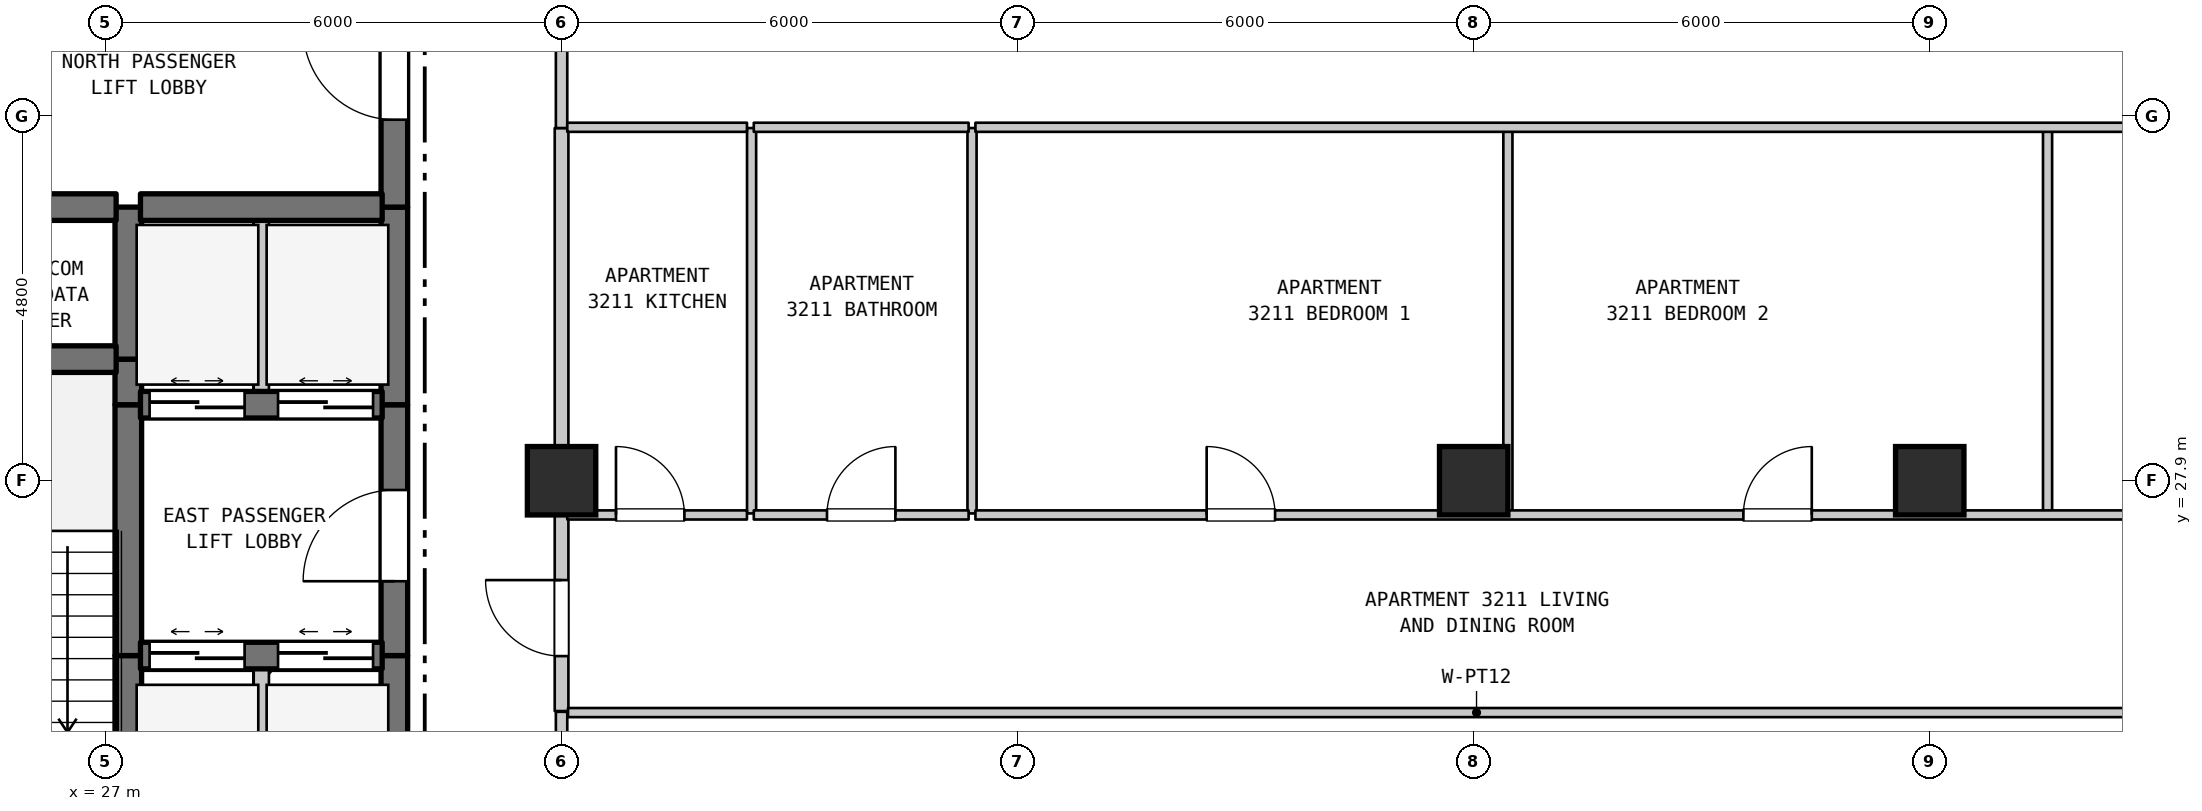
"""IFC4 building model, lengths in metres.
Left out: names, types, materials, properties, quantities, classifications, styles, units other than length and angle.
Written with IfcOpenShell. Run it as: python <this file> out.ifc"""

import sys

from ifc_helpers import new_model, si_unit, direction, frame, frame_2d, origin, origin_2d, place, context, subcontext, project, spatial, rectangle, extrude, element, fill, save


model = new_model("IFC4")
c1 = context("Model", 3, precision=1e-05, world=origin(), true_north=direction((0.0, 1.0)))
c2 = subcontext(c1, "Body", "Model", "MODEL_VIEW")
j1 = project(units=[si_unit("LENGTHUNIT", "METRE"), si_unit("PLANEANGLEUNIT", "RADIAN")], contexts=[c1])
p1 = place(None, origin())
s1 = spatial("IfcSite", under=j1, at=p1, CompositionType="ELEMENT")
p2 = place(p1, origin())
s2 = spatial("IfcBuilding", under=s1, at=p2, CompositionType="ELEMENT")
p3 = place(p2, frame((0.0, 0.0, 133.5)))
s3 = spatial("IfcBuildingStorey", under=s2, at=p3, CompositionType="ELEMENT", Elevation=133.5)
for number, where, z_axis, x_axis in (
    (1, (33.0, 27.9, 0.0), (0.0, 0.0, 1.0), (1.0, 0.0, 0.0)),
    (2, (45.0, 27.9, 0.0), (0.0, 0.0, 1.0), (1.0, 0.0, 0.0)),
    (3, (51.0, 27.9, 0.0), (0.0, 0.0, 1.0), (1.0, 0.0, 0.0)),
):
    element("IfcColumn", number, at=place(p3, frame(where, z_axis=z_axis, x_axis=x_axis)), inside=s3, PredefinedType="COLUMN", context=c2, shape_type="SweptSolid", body=[
        extrude(rectangle(XDim=0.9, YDim=0.9, at=origin_2d()), origin(), (0.0, 0.0, 1.0), 3.7),
    ])
p4 = place(p3, frame((27.3, 22.7, 0.0), z_axis=(0.0, 0.0, 1.0), x_axis=(0.0, 1.0, 0.0)))
e4 = element("IfcWall", 4, at=p4, inside=s3, PredefinedType="SHEAR", context=c2, shape_type="SweptSolid", body=[
    extrude(rectangle(XDim=2.9, YDim=0.35, at=frame_2d((1.45, 0.0))), origin(), (0.0, 0.0, 1.0), 3.385),
])
p5 = place(p3, frame((27.3, 25.6, 0.0), z_axis=(0.0, 0.0, 1.0), x_axis=(0.0, 1.0, 0.0)))
e5 = element("IfcWall", 5, at=p5, inside=s3, PredefinedType="SHEAR", context=c2, shape_type="SweptSolid", body=[
    extrude(rectangle(XDim=3.3, YDim=0.35, at=frame_2d((1.65, 0.0))), origin(), (0.0, 0.0, 1.0), 3.385),
])
p6 = place(p3, frame((27.3, 28.9, 0.0), z_axis=(0.0, 0.0, 1.0), x_axis=(0.0, 1.0, 0.0)))
e6 = element("IfcWall", 6, at=p6, inside=s3, PredefinedType="SHEAR", context=c2, shape_type="SweptSolid", body=[
    extrude(rectangle(XDim=0.6, YDim=0.35, at=frame_2d((0.3, 0.0))), origin(), (0.0, 0.0, 1.0), 3.385),
])
p7 = place(p3, frame((27.3, 29.5, 0.0), z_axis=(0.0, 0.0, 1.0), x_axis=(0.0, 1.0, 0.0)))
e7 = element("IfcWall", 7, at=p7, inside=s3, PredefinedType="SHEAR", context=c2, shape_type="SweptSolid", body=[
    extrude(rectangle(XDim=2.0, YDim=0.35, at=frame_2d((1.0, 0.0))), origin(), (0.0, 0.0, 1.0), 3.385),
])
p8 = place(p3, frame((29.05, 22.7, 0.0), z_axis=(0.0, 0.0, 1.0), x_axis=(0.0, 1.0, 0.0)))
e8 = element("IfcWall", 8, at=p8, inside=s3, PredefinedType="STANDARD", context=c2, shape_type="SweptSolid", body=[
    extrude(rectangle(XDim=2.9, YDim=0.2, at=frame_2d((1.45, 0.0))), origin(), (0.0, 0.0, 1.0), 3.385),
])
p9 = place(p3, frame((29.05, 28.9, 0.0), z_axis=(0.0, 0.0, 1.0), x_axis=(0.0, 1.0, 0.0)))
e9 = element("IfcWall", 9, at=p9, inside=s3, PredefinedType="STANDARD", context=c2, shape_type="SweptSolid", body=[
    extrude(rectangle(XDim=2.6, YDim=0.2, at=frame_2d((1.3, 0.0))), origin(), (0.0, 0.0, 1.0), 3.385),
])
p10 = place(p3, frame((30.8, 22.7, 0.0), z_axis=(0.0, 0.0, 1.0), x_axis=(0.0, 1.0, 0.0)))
e10 = element("IfcWall", 10, at=p10, inside=s3, PredefinedType="SHEAR", context=c2, shape_type="SweptSolid", body=[
    extrude(rectangle(XDim=2.9, YDim=0.35, at=frame_2d((1.45, 0.0))), origin(), (0.0, 0.0, 1.0), 3.385),
])
p11 = place(p3, frame((30.8, 25.6, 0.0), z_axis=(0.0, 0.0, 1.0), x_axis=(0.0, 1.0, 0.0)))
e11 = element("IfcWall", 11, at=p11, inside=s3, PredefinedType="SHEAR", context=c2, shape_type="SweptSolid", body=[
    extrude(rectangle(XDim=3.3, YDim=0.35, at=frame_2d((1.65, 0.0))), origin(), (0.0, 0.0, 1.0), 3.385),
])
p12 = place(p11, frame((0.978, 0.0, 0.0)))
e12 = element("IfcOpeningElement", 12, at=p12, cuts=e11, PredefinedType="OPENING", context=c2, shape_type="SweptSolid", body=[
    extrude(rectangle(XDim=1.2, YDim=2.2, at=frame_2d((0.6, 1.1))), frame((0.0, 0.185, 0.0), z_axis=(0.0, -1.0, 0.0), x_axis=(1.0, 0.0, 0.0)), (0.0, 0.0, 1.0), 0.37),
])
p13 = place(p3, frame((30.8, 28.9, 0.0), z_axis=(0.0, 0.0, 1.0), x_axis=(0.0, 1.0, 0.0)))
e13 = element("IfcWall", 13, at=p13, inside=s3, PredefinedType="SHEAR", context=c2, shape_type="SweptSolid", body=[
    extrude(rectangle(XDim=2.6, YDim=0.35, at=frame_2d((1.3, 0.0))), origin(), (0.0, 0.0, 1.0), 3.385),
])
p14 = place(p3, frame((30.8, 31.5, 0.0), z_axis=(0.0, 0.0, 1.0), x_axis=(0.0, 1.0, 0.0)))
e14 = element("IfcWall", 14, at=p14, inside=s3, PredefinedType="SHEAR", context=c2, shape_type="SweptSolid", body=[
    extrude(rectangle(XDim=3.5, YDim=0.35, at=frame_2d((1.75, 0.0))), origin(), (0.0, 0.0, 1.0), 3.385),
])
p15 = place(p14, frame((1.15, 0.0, 0.0)))
e15 = element("IfcOpeningElement", 15, at=p15, cuts=e14, PredefinedType="OPENING", context=c2, shape_type="SweptSolid", body=[
    extrude(rectangle(XDim=1.2, YDim=2.2, at=frame_2d((0.6, 1.1))), frame((0.0, 0.185, 0.0), z_axis=(0.0, -1.0, 0.0), x_axis=(1.0, 0.0, 0.0)), (0.0, 0.0, 1.0), 0.37),
])
p16 = place(p3, frame((33.0, 19.51, 0.0), z_axis=(0.0, 0.0, 1.0), x_axis=(0.0, 1.0, 0.0)))
e16 = element("IfcWall", 16, at=p16, inside=s3, PredefinedType="STANDARD", context=c2, shape_type="SweptSolid", body=[
    extrude(rectangle(XDim=5.35, YDim=0.15, at=frame_2d((2.675, 0.0))), origin(), (0.0, 0.0, 1.0), 2.935),
])
p17 = place(p16, frame((1.534, 0.0, 0.0)))
e17 = element("IfcOpeningElement", 17, at=p17, cuts=e16, PredefinedType="OPENING", context=c2, shape_type="SweptSolid", body=[
    extrude(rectangle(XDim=1.0, YDim=2.15, at=frame_2d((0.5, 1.075))), frame((0.0, 0.085, 0.0), z_axis=(0.0, -1.0, 0.0), x_axis=(1.0, 0.0, 0.0)), (0.0, 0.0, 1.0), 0.17),
])
p18 = place(p3, frame((33.0, 24.87, 0.0), z_axis=(0.0, 0.0, 1.0), x_axis=(0.0, 1.0, 0.0)))
e18 = element("IfcWall", 18, at=p18, inside=s3, PredefinedType="STANDARD", context=c2, shape_type="SweptSolid", body=[
    extrude(rectangle(XDim=2.6, YDim=0.18, at=frame_2d((1.3, 0.0))), origin(), (0.0, 0.0, 1.0), 2.935),
])
p19 = place(p18, frame((0.723, 0.0, 0.0)))
e19 = element("IfcOpeningElement", 19, at=p19, cuts=e18, PredefinedType="OPENING", context=c2, shape_type="SweptSolid", body=[
    extrude(rectangle(XDim=1.0, YDim=2.15, at=frame_2d((0.5, 1.075))), frame((0.0, 0.1, 0.0), z_axis=(0.0, -1.0, 0.0), x_axis=(1.0, 0.0, 0.0)), (0.0, 0.0, 1.0), 0.2),
])
p20 = place(p3, frame((33.0, 27.47, 0.0), z_axis=(0.0, 0.0, 1.0), x_axis=(0.0, 1.0, 0.0)))
e20 = element("IfcWall", 20, at=p20, inside=s3, PredefinedType="STANDARD", context=c2, shape_type="SweptSolid", body=[
    extrude(rectangle(XDim=5.07, YDim=0.18, at=frame_2d((2.535, 0.0))), origin(), (0.0, 0.0, 1.0), 2.885),
])
p21 = place(p3, frame((33.0, 32.54, 0.0), z_axis=(0.0, 0.0, 1.0), x_axis=(0.0, 1.0, 0.0)))
e21 = element("IfcWall", 21, at=p21, inside=s3, PredefinedType="STANDARD", context=c2, shape_type="SweptSolid", body=[
    extrude(rectangle(XDim=5.36, YDim=0.15, at=frame_2d((2.68, 0.0))), origin(), (0.0, 0.0, 1.0), 2.885),
])
p22 = place(p21, frame((2.109, 0.0, 0.0)))
e22 = element("IfcOpeningElement", 22, at=p22, cuts=e21, PredefinedType="OPENING", context=c2, shape_type="SweptSolid", body=[
    extrude(rectangle(XDim=1.0, YDim=2.15, at=frame_2d((0.5, 1.075))), frame((0.0, 0.085, 0.0), z_axis=(0.0, -1.0, 0.0), x_axis=(1.0, 0.0, 0.0)), (0.0, 0.0, 1.0), 0.17),
])
for number, where, z_axis, x_axis in (
    (23, (35.5, 27.47, 0.0), (0.0, 0.0, 1.0), (0.0, 1.0, 0.0)),
    (24, (38.4, 27.47, 0.0), (0.0, 0.0, 1.0), (0.0, 1.0, 0.0)),
    (25, (45.45, 27.47, 0.0), (0.0, 0.0, 1.0), (0.0, 1.0, 0.0)),
    (26, (52.55, 27.47, 0.0), (0.0, 0.0, 1.0), (0.0, 1.0, 0.0)),
):
    element("IfcWall", number, at=place(p3, frame(where, z_axis=z_axis, x_axis=x_axis)), inside=s3, PredefinedType="PARTITIONING", context=c2, shape_type="SweptSolid", body=[
        extrude(rectangle(XDim=5.07, YDim=0.12, at=frame_2d((2.535, 0.0))), origin(), (0.0, 0.0, 1.0), 3.385),
    ])
p23 = place(p3, frame((33.085, 24.85, 0.0), z_axis=(0.0, 0.0, 1.0), x_axis=(1.0, 0.0, 0.0)))
e27 = element("IfcWall", 27, at=p23, inside=s3, PredefinedType="PARTITIONING", context=c2, shape_type="SweptSolid", body=[
    extrude(rectangle(XDim=23.905, YDim=0.12, at=frame_2d((11.953, 0.0))), origin(), (0.0, 0.0, 1.0), 3.385),
])
p24 = place(p3, frame((27.46, 25.6, 0.0), z_axis=(0.0, 0.0, 1.0), x_axis=(1.0, 0.0, 0.0)))
e28 = element("IfcWall", 28, at=p24, inside=s3, PredefinedType="SHEAR", context=c2, shape_type="SweptSolid", body=[
    extrude(rectangle(XDim=3.18, YDim=0.35, at=frame_2d((1.59, 0.0))), origin(), (0.0, 0.0, 1.0), 3.385),
])
p25 = place(p24, frame((0.12, 0.0, 0.0)))
e29 = element("IfcOpeningElement", 29, at=p25, cuts=e28, PredefinedType="OPENING", context=c2, shape_type="SweptSolid", body=[
    extrude(rectangle(XDim=1.25, YDim=2.2, at=frame_2d((0.625, 1.1))), frame((0.0, 0.185, 0.0), z_axis=(0.0, -1.0, 0.0), x_axis=(1.0, 0.0, 0.0)), (0.0, 0.0, 1.0), 0.37),
])
p26 = place(p24, frame((1.81, 0.0, 0.0)))
e30 = element("IfcOpeningElement", 30, at=p26, cuts=e28, PredefinedType="OPENING", context=c2, shape_type="SweptSolid", body=[
    extrude(rectangle(XDim=1.25, YDim=2.2, at=frame_2d((0.625, 1.1))), frame((0.0, 0.185, 0.0), z_axis=(0.0, -1.0, 0.0), x_axis=(1.0, 0.0, 0.0)), (0.0, 0.0, 1.0), 0.37),
])
p27 = place(p3, frame((33.075, 27.45, 0.0), z_axis=(0.0, 0.0, 1.0), x_axis=(1.0, 0.0, 0.0)))
e31 = element("IfcWall", 31, at=p27, inside=s3, PredefinedType="PARTITIONING", context=c2, shape_type="SweptSolid", body=[
    extrude(rectangle(XDim=2.364, YDim=0.12, at=frame_2d((1.182, 0.0))), origin(), (0.0, 0.0, 1.0), 3.385),
])
p28 = place(p27, frame((0.641, 0.0, 0.0)))
e32 = element("IfcOpeningElement", 32, at=p28, cuts=e31, PredefinedType="OPENING", context=c2, shape_type="SweptSolid", body=[
    extrude(rectangle(XDim=0.9, YDim=2.15, at=frame_2d((0.45, 1.075))), frame((0.0, 0.07, 0.0), z_axis=(0.0, -1.0, 0.0), x_axis=(1.0, 0.0, 0.0)), (0.0, 0.0, 1.0), 0.14),
])
p29 = place(p3, frame((35.529, 27.45, 0.0), z_axis=(0.0, 0.0, 1.0), x_axis=(1.0, 0.0, 0.0)))
e33 = element("IfcWall", 33, at=p29, inside=s3, PredefinedType="PARTITIONING", context=c2, shape_type="SweptSolid", body=[
    extrude(rectangle(XDim=2.826, YDim=0.12, at=frame_2d((1.413, 0.0))), origin(), (0.0, 0.0, 1.0), 3.385),
])
p30 = place(p29, frame((0.963, 0.0, 0.0)))
e34 = element("IfcOpeningElement", 34, at=p30, cuts=e33, PredefinedType="OPENING", context=c2, shape_type="SweptSolid", body=[
    extrude(rectangle(XDim=0.9, YDim=2.1, at=frame_2d((0.45, 1.05))), frame((0.0, 0.07, 0.0), z_axis=(0.0, -1.0, 0.0), x_axis=(1.0, 0.0, 0.0)), (0.0, 0.0, 1.0), 0.14),
])
p31 = place(p3, frame((38.445, 27.45, 0.0), z_axis=(0.0, 0.0, 1.0), x_axis=(1.0, 0.0, 0.0)))
e35 = element("IfcWall", 35, at=p31, inside=s3, PredefinedType="PARTITIONING", context=c2, shape_type="SweptSolid", body=[
    extrude(rectangle(XDim=18.545, YDim=0.12, at=frame_2d((9.272, 0.0))), origin(), (0.0, 0.0, 1.0), 3.385),
])
p32 = place(p31, frame((3.042, 0.0, 0.0)))
e36 = element("IfcOpeningElement", 36, at=p32, cuts=e35, PredefinedType="OPENING", context=c2, shape_type="SweptSolid", body=[
    extrude(rectangle(XDim=0.9, YDim=2.15, at=frame_2d((0.45, 1.075))), frame((0.0, 0.07, 0.0), z_axis=(0.0, -1.0, 0.0), x_axis=(1.0, 0.0, 0.0)), (0.0, 0.0, 1.0), 0.14),
])
p33 = place(p31, frame((10.103, 0.0, 0.0)))
e37 = element("IfcOpeningElement", 37, at=p33, cuts=e35, PredefinedType="OPENING", context=c2, shape_type="SweptSolid", body=[
    extrude(rectangle(XDim=0.9, YDim=2.15, at=frame_2d((0.45, 1.075))), frame((0.0, 0.07, 0.0), z_axis=(0.0, -1.0, 0.0), x_axis=(1.0, 0.0, 0.0)), (0.0, 0.0, 1.0), 0.14),
])
p34 = place(p31, frame((15.791, 0.0, 0.0)))
e38 = element("IfcOpeningElement", 38, at=p34, cuts=e35, PredefinedType="OPENING", context=c2, shape_type="SweptSolid", body=[
    extrude(rectangle(XDim=0.9, YDim=2.15, at=frame_2d((0.45, 1.075))), frame((0.0, 0.07, 0.0), z_axis=(0.0, -1.0, 0.0), x_axis=(1.0, 0.0, 0.0)), (0.0, 0.0, 1.0), 0.14),
])
p35 = place(p3, frame((27.46, 28.9, 0.0), z_axis=(0.0, 0.0, 1.0), x_axis=(1.0, 0.0, 0.0)))
e39 = element("IfcWall", 39, at=p35, inside=s3, PredefinedType="SHEAR", context=c2, shape_type="SweptSolid", body=[
    extrude(rectangle(XDim=3.18, YDim=0.35, at=frame_2d((1.59, 0.0))), origin(), (0.0, 0.0, 1.0), 3.385),
])
p36 = place(p35, frame((0.12, 0.0, 0.0)))
e40 = element("IfcOpeningElement", 40, at=p36, cuts=e39, PredefinedType="OPENING", context=c2, shape_type="SweptSolid", body=[
    extrude(rectangle(XDim=1.25, YDim=2.2, at=frame_2d((0.625, 1.1))), frame((0.0, 0.185, 0.0), z_axis=(0.0, -1.0, 0.0), x_axis=(1.0, 0.0, 0.0)), (0.0, 0.0, 1.0), 0.37),
])
p37 = place(p35, frame((1.81, 0.0, 0.0)))
e41 = element("IfcOpeningElement", 41, at=p37, cuts=e39, PredefinedType="OPENING", context=c2, shape_type="SweptSolid", body=[
    extrude(rectangle(XDim=1.25, YDim=2.2, at=frame_2d((0.625, 1.1))), frame((0.0, 0.185, 0.0), z_axis=(0.0, -1.0, 0.0), x_axis=(1.0, 0.0, 0.0)), (0.0, 0.0, 1.0), 0.37),
])
p38 = place(p3, frame((23.96, 29.5, 0.0), z_axis=(0.0, 0.0, 1.0), x_axis=(1.0, 0.0, 0.0)))
e42 = element("IfcWall", 42, at=p38, inside=s3, PredefinedType="SHEAR", context=c2, shape_type="SweptSolid", body=[
    extrude(rectangle(XDim=3.18, YDim=0.35, at=frame_2d((1.59, 0.0))), origin(), (0.0, 0.0, 1.0), 3.385),
])
p39 = place(p3, frame((23.96, 31.5, 0.0), z_axis=(0.0, 0.0, 1.0), x_axis=(1.0, 0.0, 0.0)))
e43 = element("IfcWall", 43, at=p39, inside=s3, PredefinedType="SHEAR", context=c2, shape_type="SweptSolid", body=[
    extrude(rectangle(XDim=3.18, YDim=0.35, at=frame_2d((1.59, 0.0))), origin(), (0.0, 0.0, 1.0), 3.385),
])
p40 = place(p39, frame((1.094, 0.0, 0.0)))
e44 = element("IfcOpeningElement", 44, at=p40, cuts=e43, PredefinedType="OPENING", context=c2, shape_type="SweptSolid", body=[
    extrude(rectangle(XDim=0.85, YDim=2.1, at=frame_2d((0.425, 1.05))), frame((0.0, 0.185, 0.0), z_axis=(0.0, -1.0, 0.0), x_axis=(1.0, 0.0, 0.0)), (0.0, 0.0, 1.0), 0.37),
])
p41 = place(p3, frame((27.46, 31.5, 0.0), z_axis=(0.0, 0.0, 1.0), x_axis=(1.0, 0.0, 0.0)))
e45 = element("IfcWall", 45, at=p41, inside=s3, PredefinedType="SHEAR", context=c2, shape_type="SweptSolid", body=[
    extrude(rectangle(XDim=3.18, YDim=0.35, at=frame_2d((1.59, 0.0))), origin(), (0.0, 0.0, 1.0), 3.385),
])
p42 = place(p3, frame((33.075, 32.55, 0.0), z_axis=(0.0, 0.0, 1.0), x_axis=(1.0, 0.0, 0.0)))
e46 = element("IfcWall", 46, at=p42, inside=s3, PredefinedType="PARTITIONING", context=c2, shape_type="SweptSolid", body=[
    extrude(rectangle(XDim=2.364, YDim=0.12, at=frame_2d((1.182, 0.0))), origin(), (0.0, 0.0, 1.0), 3.385),
])
p43 = place(p3, frame((35.529, 32.55, 0.0), z_axis=(0.0, 0.0, 1.0), x_axis=(1.0, 0.0, 0.0)))
e47 = element("IfcWall", 47, at=p43, inside=s3, PredefinedType="PARTITIONING", context=c2, shape_type="SweptSolid", body=[
    extrude(rectangle(XDim=2.826, YDim=0.12, at=frame_2d((1.413, 0.0))), origin(), (0.0, 0.0, 1.0), 3.385),
])
p44 = place(p3, frame((38.445, 32.55, 0.0), z_axis=(0.0, 0.0, 1.0), x_axis=(1.0, 0.0, 0.0)))
e48 = element("IfcWall", 48, at=p44, inside=s3, PredefinedType="PARTITIONING", context=c2, shape_type="SweptSolid", body=[
    extrude(rectangle(XDim=21.335, YDim=0.12, at=frame_2d((10.667, 0.0))), origin(), (0.0, 0.0, 1.0), 3.385),
])
p45 = place(p12, origin())
e49 = element("IfcDoor", 49, at=p45, inside=s3, OperationType="SINGLE_SWING_LEFT", PredefinedType="DOOR", context=c2, shape_type="SweptSolid", body=[
    extrude(rectangle(XDim=1.2, YDim=2.2, at=frame_2d((0.6, 1.1))), frame((0.0, 0.025, 0.0), z_axis=(0.0, -1.0, 0.0), x_axis=(1.0, 0.0, 0.0)), (0.0, 0.0, 1.0), 0.05),
])
fill(e12, e49)
p46 = place(p15, origin())
e50 = element("IfcDoor", 50, at=p46, inside=s3, OperationType="SINGLE_SWING_RIGHT", PredefinedType="DOOR", context=c2, shape_type="SweptSolid", body=[
    extrude(rectangle(XDim=1.2, YDim=2.2, at=frame_2d((0.6, 1.1))), frame((0.0, 0.025, 0.0), z_axis=(0.0, -1.0, 0.0), x_axis=(1.0, 0.0, 0.0)), (0.0, 0.0, 1.0), 0.05),
])
fill(e15, e50)
p47 = place(p19, origin())
e51 = element("IfcDoor", 51, at=p47, inside=s3, OperationType="SINGLE_SWING_RIGHT", PredefinedType="DOOR", context=c2, shape_type="SweptSolid", body=[
    extrude(rectangle(XDim=1.0, YDim=2.15, at=frame_2d((0.5, 1.075))), frame((0.0, 0.025, 0.0), z_axis=(0.0, -1.0, 0.0), x_axis=(1.0, 0.0, 0.0)), (0.0, 0.0, 1.0), 0.05),
])
fill(e19, e51)
p48 = place(p25, origin())
e52 = element("IfcDoor", 52, at=p48, inside=s3, OperationType="DOUBLE_DOOR_SLIDING", PredefinedType="DOOR", context=c2, shape_type="SweptSolid", body=[
    extrude(rectangle(XDim=1.25, YDim=2.2, at=frame_2d((0.625, 1.1))), frame((0.0, 0.025, 0.0), z_axis=(0.0, -1.0, 0.0), x_axis=(1.0, 0.0, 0.0)), (0.0, 0.0, 1.0), 0.05),
])
fill(e29, e52)
p49 = place(p26, origin())
e53 = element("IfcDoor", 53, at=p49, inside=s3, OperationType="DOUBLE_DOOR_SLIDING", PredefinedType="DOOR", context=c2, shape_type="SweptSolid", body=[
    extrude(rectangle(XDim=1.25, YDim=2.2, at=frame_2d((0.625, 1.1))), frame((0.0, 0.025, 0.0), z_axis=(0.0, -1.0, 0.0), x_axis=(1.0, 0.0, 0.0)), (0.0, 0.0, 1.0), 0.05),
])
fill(e30, e53)
p50 = place(p28, origin())
e54 = element("IfcDoor", 54, at=p50, inside=s3, OperationType="SINGLE_SWING_LEFT", PredefinedType="DOOR", context=c2, shape_type="SweptSolid", body=[
    extrude(rectangle(XDim=0.9, YDim=2.15, at=frame_2d((0.45, 1.075))), frame((0.0, 0.025, 0.0), z_axis=(0.0, -1.0, 0.0), x_axis=(1.0, 0.0, 0.0)), (0.0, 0.0, 1.0), 0.05),
])
fill(e32, e54)
p51 = place(p30, origin())
e55 = element("IfcDoor", 55, at=p51, inside=s3, OperationType="SINGLE_SWING_RIGHT", PredefinedType="DOOR", context=c2, shape_type="SweptSolid", body=[
    extrude(rectangle(XDim=0.9, YDim=2.1, at=frame_2d((0.45, 1.05))), frame((0.0, 0.025, 0.0), z_axis=(0.0, -1.0, 0.0), x_axis=(1.0, 0.0, 0.0)), (0.0, 0.0, 1.0), 0.05),
])
fill(e34, e55)
p52 = place(p32, origin())
e56 = element("IfcDoor", 56, at=p52, inside=s3, OperationType="SINGLE_SWING_LEFT", PredefinedType="DOOR", context=c2, shape_type="SweptSolid", body=[
    extrude(rectangle(XDim=0.9, YDim=2.15, at=frame_2d((0.45, 1.075))), frame((0.0, 0.025, 0.0), z_axis=(0.0, -1.0, 0.0), x_axis=(1.0, 0.0, 0.0)), (0.0, 0.0, 1.0), 0.05),
])
fill(e36, e56)
p53 = place(p33, origin())
e57 = element("IfcDoor", 57, at=p53, inside=s3, OperationType="SINGLE_SWING_RIGHT", PredefinedType="DOOR", context=c2, shape_type="SweptSolid", body=[
    extrude(rectangle(XDim=0.9, YDim=2.15, at=frame_2d((0.45, 1.075))), frame((0.0, 0.025, 0.0), z_axis=(0.0, -1.0, 0.0), x_axis=(1.0, 0.0, 0.0)), (0.0, 0.0, 1.0), 0.05),
])
fill(e37, e57)
p54 = place(p36, origin())
e58 = element("IfcDoor", 58, at=p54, inside=s3, OperationType="DOUBLE_DOOR_SLIDING", PredefinedType="DOOR", context=c2, shape_type="SweptSolid", body=[
    extrude(rectangle(XDim=1.25, YDim=2.2, at=frame_2d((0.625, 1.1))), frame((0.0, 0.025, 0.0), z_axis=(0.0, -1.0, 0.0), x_axis=(1.0, 0.0, 0.0)), (0.0, 0.0, 1.0), 0.05),
])
fill(e40, e58)
p55 = place(p37, origin())
e59 = element("IfcDoor", 59, at=p55, inside=s3, OperationType="DOUBLE_DOOR_SLIDING", PredefinedType="DOOR", context=c2, shape_type="SweptSolid", body=[
    extrude(rectangle(XDim=1.25, YDim=2.2, at=frame_2d((0.625, 1.1))), frame((0.0, 0.025, 0.0), z_axis=(0.0, -1.0, 0.0), x_axis=(1.0, 0.0, 0.0)), (0.0, 0.0, 1.0), 0.05),
])
fill(e41, e59)
save(model, sys.argv[1])
